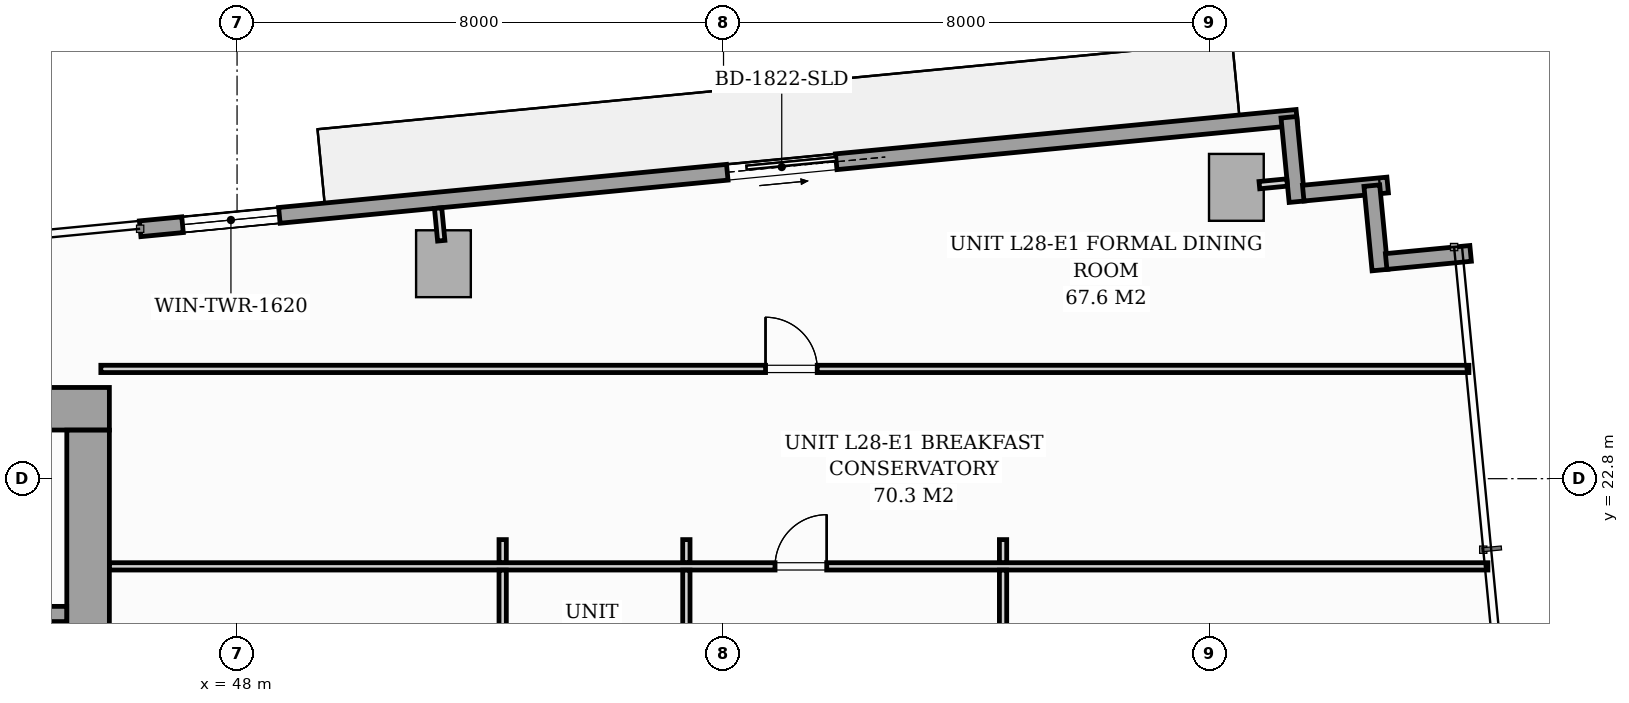
"""IFC4 building model, lengths in metres.
Left out: names, types, materials, properties, quantities, classifications, styles, units other than length and angle.
Written with IfcOpenShell. Run it as: python <this file> out.ifc"""

import sys

from ifc_helpers import new_model, si_unit, direction, frame, frame_2d, origin, origin_2d, place, context, subcontext, project, spatial, rectangle, i_section, extrude, source, transform, mapped, element, fill, save


model = new_model("IFC4")
c1 = context("Model", 3, precision=1e-05, world=origin(), true_north=direction((0.0, 1.0)))
c2 = subcontext(c1, "Body", "Model", "MODEL_VIEW")
j1 = project(units=[si_unit("LENGTHUNIT", "METRE"), si_unit("PLANEANGLEUNIT", "RADIAN")], contexts=[c1])
p1 = place(None, origin())
s1 = spatial("IfcSite", under=j1, at=p1, CompositionType="ELEMENT")
p2 = place(p1, origin())
s2 = spatial("IfcBuilding", under=s1, at=p2, CompositionType="ELEMENT")
p3 = place(p2, frame((0.0, 0.0, 100.2)))
s3 = spatial("IfcBuildingStorey", under=s2, at=p3, CompositionType="ELEMENT", Elevation=100.2)
m1 = source(origin(), c2, "Body", "SweptSolid", [
    extrude(i_section(OverallWidth=0.427, OverallDepth=0.483, WebThickness=0.051, FlangeThickness=0.082, FilletRadius=0.018, at=origin_2d()), origin(), (0.0, 0.0, 1.0), 3.196),
])
p4 = place(p3, frame((45.6, 24.0, 0.002), z_axis=(0.0, 0.0, 1.0), x_axis=(1.0, 0.0, 0.0)))
e1 = element("IfcColumn", 1, at=p4, inside=s3, PredefinedType="PILASTER", context=c2, shape_type="MappedRepresentation", body=[
    mapped(m1, transform((0.0, 0.0, 0.0), scale=1.0)),
])
m2 = source(origin(), c2, "Body", "SweptSolid", [
    extrude(rectangle(XDim=0.9, YDim=1.1, at=origin_2d()), origin(), (0.0, 0.0, 1.0), 3.196),
])
for number, where, z_axis, x_axis in (
    (2, (51.394, 26.335, 0.002), (0.0, 0.0, 1.0), (0.995, 0.096, 0.0)),
    (3, (64.434, 27.591, 0.002), (0.0, 0.0, 1.0), (0.995, 0.096, 0.0)),
):
    element("IfcColumn", number, at=place(p3, frame(where, z_axis=z_axis, x_axis=x_axis)), inside=s3, PredefinedType="COLUMN", context=c2, shape_type="MappedRepresentation", body=[
        mapped(m2, transform((0.0, 0.0, 0.0), scale=1.0)),
    ])
p5 = place(p3, frame((46.406, 26.91, 0.0), z_axis=(0.0, 0.0, 1.0), x_axis=(0.995396638587, 0.095841180552, 0.0)))
e4 = element("IfcWall", 4, at=p5, inside=s3, PredefinedType="STANDARD", context=c2, shape_type="SweptSolid", body=[
    extrude(rectangle(XDim=19.11, YDim=0.26, at=frame_2d((9.555, 0.0))), origin(), (0.0, 0.0, 1.0), 2.94),
])
p6 = place(p5, frame((9.7, 0.0, 0.0)))
e5 = element("IfcOpeningElement", 5, at=p6, cuts=e4, PredefinedType="OPENING", context=c2, shape_type="SweptSolid", body=[
    extrude(rectangle(XDim=1.8, YDim=2.06, at=frame_2d((0.9, 1.03))), frame((0.0, 0.14, 0.0), z_axis=(0.0, -1.0, 0.0), x_axis=(1.0, 0.0, 0.0)), (0.0, 0.0, 1.0), 0.28),
])
p7 = place(p5, frame((0.7, 0.0, 0.65)))
e6 = element("IfcOpeningElement", 6, at=p7, cuts=e4, PredefinedType="OPENING", context=c2, shape_type="SweptSolid", body=[
    extrude(rectangle(XDim=1.6, YDim=1.5, at=frame_2d((0.8, 0.75))), frame((0.0, 0.14, 0.0), z_axis=(0.0, -1.0, 0.0), x_axis=(1.0, 0.0, 0.0)), (0.0, 0.0, 1.0), 0.28),
])
for number, where, z_axis, x_axis in (
    (7, (65.298, 28.744, 0.0), (0.0, 0.0, 1.0), (0.096, -0.995, 0.0)),
    (8, (65.533, 27.496, 0.0), (0.0, 0.0, 1.0), (0.995, 0.096, 0.0)),
):
    element("IfcWall", number, at=place(p3, frame(where, z_axis=z_axis, x_axis=x_axis)), inside=s3, PredefinedType="STANDARD", context=c2, shape_type="SweptSolid", body=[
        extrude(rectangle(XDim=1.395, YDim=0.26, at=frame_2d((0.698, 0.0))), origin(), (0.0, 0.0, 1.0), 2.94),
    ])
p8 = place(p3, frame((66.662, 27.619, 0.0), z_axis=(0.0, 0.0, 1.0), x_axis=(0.095742423056, -0.99540614245, 0.0)))
e9 = element("IfcWall", 9, at=p8, inside=s3, PredefinedType="STANDARD", context=c2, shape_type="SweptSolid", body=[
    extrude(rectangle(XDim=1.395, YDim=0.26, at=frame_2d((0.697, 0.0))), origin(), (0.0, 0.0, 1.0), 2.94),
])
p9 = place(p3, frame((66.897, 26.371, 0.0), z_axis=(0.0, 0.0, 1.0), x_axis=(0.995391056452, 0.09589913835, 0.0)))
e10 = element("IfcWall", 10, at=p9, inside=s3, PredefinedType="STANDARD", context=c2, shape_type="SweptSolid", body=[
    extrude(rectangle(XDim=1.395, YDim=0.26, at=frame_2d((0.698, 0.0))), origin(), (0.0, 0.0, 1.0), 2.94),
])
p10 = place(p3, frame((26.1, 23.95, 0.0), z_axis=(0.0, 0.0, 1.0), x_axis=(1.0, 0.0, 0.0)))
e11 = element("IfcWall", 11, at=p10, inside=s3, PredefinedType="SHEAR", context=c2, shape_type="SweptSolid", body=[
    extrude(rectangle(XDim=19.8, YDim=0.7, at=frame_2d((9.9, 0.0))), origin(), (0.0, 0.0, 1.0), 3.2),
])
p11 = place(p3, frame((45.55, 17.802, 0.0), z_axis=(0.0, 0.0, 1.0), x_axis=(0.0, 1.0, 0.0)))
e12 = element("IfcWall", 12, at=p11, inside=s3, PredefinedType="SHEAR", context=c2, shape_type="SweptSolid", body=[
    extrude(rectangle(XDim=5.796, YDim=0.7, at=frame_2d((2.898, 0.0))), origin(), (0.0, 0.0, 1.0), 3.2),
])
p12 = place(p3, frame((37.05, 20.575, 0.0), z_axis=(0.0, 0.0, 1.0), x_axis=(1.0, 0.0, 0.0)))
e13 = element("IfcWall", 13, at=p12, inside=s3, PredefinedType="SOLIDWALL", context=c2, shape_type="SweptSolid", body=[
    extrude(rectangle(XDim=8.148, YDim=0.25, at=frame_2d((4.074, 0.0))), origin(), (0.0, 0.0, 1.0), 3.2),
])
p13 = place(p12, frame((6.6, 0.0, 0.0)))
e14 = element("IfcOpeningElement", 14, at=p13, cuts=e13, PredefinedType="OPENING", context=c2, shape_type="SweptSolid", body=[
    extrude(rectangle(XDim=0.95, YDim=2.06, at=frame_2d((0.475, 1.03))), frame((0.0, 0.135, 0.0), z_axis=(0.0, -1.0, 0.0), x_axis=(1.0, 0.0, 0.0)), (0.0, 0.0, 1.0), 0.27),
])
p14 = place(p3, frame((45.76, 24.605, 0.0), z_axis=(0.0, 0.0, 1.0), x_axis=(1.0, 0.0, 0.0)))
e15 = element("IfcWall", 15, at=p14, inside=s3, PredefinedType="PARTITIONING", context=c2, shape_type="SweptSolid", body=[
    extrude(rectangle(XDim=22.498, YDim=0.12, at=frame_2d((11.249, 0.0))), origin(), (0.0, 0.0, 1.0), 2.94),
])
p15 = place(p14, frame((10.931, 0.0, 0.0)))
e16 = element("IfcOpeningElement", 16, at=p15, cuts=e15, PredefinedType="OPENING", context=c2, shape_type="SweptSolid", body=[
    extrude(rectangle(XDim=0.85, YDim=2.05, at=frame_2d((0.425, 1.025))), frame((0.0, 0.07, 0.0), z_axis=(0.0, -1.0, 0.0), x_axis=(1.0, 0.0, 0.0)), (0.0, 0.0, 1.0), 0.14),
])
p16 = place(p3, frame((45.902, 21.358, 0.0), z_axis=(0.0, 0.0, 1.0), x_axis=(1.0, 0.0, 0.0)))
e17 = element("IfcWall", 17, at=p16, inside=s3, PredefinedType="PARTITIONING", context=c2, shape_type="SweptSolid", body=[
    extrude(rectangle(XDim=22.668, YDim=0.12, at=frame_2d((11.334, 0.0))), origin(), (0.0, 0.0, 1.0), 2.94),
])
p17 = place(p16, frame((10.945, 0.0, 0.0)))
e18 = element("IfcOpeningElement", 18, at=p17, cuts=e17, PredefinedType="OPENING", context=c2, shape_type="SweptSolid", body=[
    extrude(rectangle(XDim=0.85, YDim=2.05, at=frame_2d((0.425, 1.025))), frame((0.0, 0.07, 0.0), z_axis=(0.0, -1.0, 0.0), x_axis=(1.0, 0.0, 0.0)), (0.0, 0.0, 1.0), 0.14),
])
p18 = place(p3, frame((60.597, 10.209, 0.0), z_axis=(0.0, 0.0, 1.0), x_axis=(0.0, 1.0, 0.0)))
e19 = element("IfcWall", 19, at=p18, inside=s3, PredefinedType="PARTITIONING", context=c2, shape_type="SweptSolid", body=[
    extrude(rectangle(XDim=11.087, YDim=0.12, at=frame_2d((5.543, 0.0))), origin(), (0.0, 0.0, 1.0), 2.94),
])
p19 = place(p18, frame((5.118, 0.0, 0.0)))
e20 = element("IfcOpeningElement", 20, at=p19, cuts=e19, PredefinedType="OPENING", context=c2, shape_type="SweptSolid", body=[
    extrude(rectangle(XDim=0.85, YDim=2.05, at=frame_2d((0.425, 1.025))), frame((0.0, 0.07, 0.0), z_axis=(0.0, -1.0, 0.0), x_axis=(1.0, 0.0, 0.0)), (0.0, 0.0, 1.0), 0.14),
])
p20 = place(p3, frame((60.597, 21.42, 0.0), z_axis=(0.0, 0.0, 1.0), x_axis=(0.0, 1.0, 0.0)))
e21 = element("IfcWall", 21, at=p20, inside=s3, PredefinedType="PARTITIONING", context=c2, shape_type="SweptSolid", body=[
    extrude(rectangle(XDim=0.378, YDim=0.12, at=frame_2d((0.189, 0.0))), origin(), (0.0, 0.0, 1.0), 2.94),
])
p21 = place(p3, frame((55.389, 10.209, 0.0), z_axis=(0.0, 0.0, 1.0), x_axis=(0.0, 1.0, 0.0)))
e22 = element("IfcWall", 22, at=p21, inside=s3, PredefinedType="PARTITIONING", context=c2, shape_type="SweptSolid", body=[
    extrude(rectangle(XDim=11.087, YDim=0.12, at=frame_2d((5.543, 0.0))), origin(), (0.0, 0.0, 1.0), 2.94),
])
p22 = place(p21, frame((5.118, 0.0, 0.0)))
e23 = element("IfcOpeningElement", 23, at=p22, cuts=e22, PredefinedType="OPENING", context=c2, shape_type="SweptSolid", body=[
    extrude(rectangle(XDim=0.85, YDim=2.05, at=frame_2d((0.425, 1.025))), frame((0.0, 0.07, 0.0), z_axis=(0.0, -1.0, 0.0), x_axis=(1.0, 0.0, 0.0)), (0.0, 0.0, 1.0), 0.14),
])
p23 = place(p3, frame((55.389, 21.42, 0.0), z_axis=(0.0, 0.0, 1.0), x_axis=(0.0, 1.0, 0.0)))
e24 = element("IfcWall", 24, at=p23, inside=s3, PredefinedType="PARTITIONING", context=c2, shape_type="SweptSolid", body=[
    extrude(rectangle(XDim=0.378, YDim=0.12, at=frame_2d((0.189, 0.0))), origin(), (0.0, 0.0, 1.0), 2.94),
])
p24 = place(p3, frame((52.368, 10.209, 0.0), z_axis=(0.0, 0.0, 1.0), x_axis=(0.0, 1.0, 0.0)))
e25 = element("IfcWall", 25, at=p24, inside=s3, PredefinedType="PARTITIONING", context=c2, shape_type="SweptSolid", body=[
    extrude(rectangle(XDim=11.087, YDim=0.12, at=frame_2d((5.543, 0.0))), origin(), (0.0, 0.0, 1.0), 2.94),
])
p25 = place(p24, frame((5.118, 0.0, 0.0)))
e26 = element("IfcOpeningElement", 26, at=p25, cuts=e25, PredefinedType="OPENING", context=c2, shape_type="SweptSolid", body=[
    extrude(rectangle(XDim=0.85, YDim=2.05, at=frame_2d((0.425, 1.025))), frame((0.0, 0.07, 0.0), z_axis=(0.0, -1.0, 0.0), x_axis=(1.0, 0.0, 0.0)), (0.0, 0.0, 1.0), 0.14),
])
p26 = place(p3, frame((52.368, 21.42, 0.0), z_axis=(0.0, 0.0, 1.0), x_axis=(0.0, 1.0, 0.0)))
e27 = element("IfcWall", 27, at=p26, inside=s3, PredefinedType="PARTITIONING", context=c2, shape_type="SweptSolid", body=[
    extrude(rectangle(XDim=0.378, YDim=0.12, at=frame_2d((0.189, 0.0))), origin(), (0.0, 0.0, 1.0), 2.94),
])
p27 = place(p3, frame((51.358, 26.713, 0.0), z_axis=(0.0, 0.0, 1.0), x_axis=(-0.095772948675, 0.995403205893, 0.0)))
e28 = element("IfcWall", 28, at=p27, inside=s3, PredefinedType="PARTITIONING", context=c2, shape_type="SweptSolid", body=[
    extrude(rectangle(XDim=0.538, YDim=0.12, at=frame_2d((0.269, 0.0))), origin(), (0.0, 0.0, 1.0), 2.94),
])
p28 = place(p3, frame((64.812, 27.627, 0.0), z_axis=(0.0, 0.0, 1.0), x_axis=(0.995389482415, 0.095915474751, 0.0)))
e29 = element("IfcWall", 29, at=p28, inside=s3, PredefinedType="PARTITIONING", context=c2, shape_type="SweptSolid", body=[
    extrude(rectangle(XDim=0.458, YDim=0.12, at=frame_2d((0.229, 0.0))), origin(), (0.0, 0.0, 1.0), 2.94),
])
m3 = source(origin(), c2, "Body", "SweptSolid", [
    extrude(rectangle(XDim=1.8, YDim=2.06, at=frame_2d((0.9, 1.03))), frame((0.0, 0.025, 0.0), z_axis=(0.0, -1.0, 0.0), x_axis=(1.0, 0.0, 0.0)), (0.0, 0.0, 1.0), 0.05),
])
p29 = place(p6, origin())
e30 = element("IfcDoor", 30, at=p29, inside=s3, OperationType="SLIDING_TO_RIGHT", PredefinedType="DOOR", context=c2, shape_type="MappedRepresentation", body=[
    mapped(m3, transform((0.0, 0.0, 0.0), scale=1.0)),
])
fill(e5, e30)
m4 = source(origin(), c2, "Body", "SweptSolid", [
    extrude(rectangle(XDim=1.6, YDim=1.5, at=frame_2d((0.8, 0.75))), frame((0.0, 0.03, 0.0), z_axis=(0.0, -1.0, 0.0), x_axis=(1.0, 0.0, 0.0)), (0.0, 0.0, 1.0), 0.06),
])
p30 = place(p7, origin())
e31 = element("IfcWindow", 31, at=p30, inside=s3, PartitioningType="SINGLE_PANEL", PredefinedType="WINDOW", context=c2, shape_type="MappedRepresentation", body=[
    mapped(m4, transform((0.0, 0.0, 0.0), scale=1.0)),
])
fill(e6, e31)
m5 = source(origin(), c2, "Body", "SweptSolid", [
    extrude(rectangle(XDim=0.85, YDim=2.05, at=frame_2d((0.425, 1.025))), frame((0.0, 0.025, 0.0), z_axis=(0.0, -1.0, 0.0), x_axis=(1.0, 0.0, 0.0)), (0.0, 0.0, 1.0), 0.05),
])
p31 = place(p15, origin())
e32 = element("IfcDoor", 32, at=p31, inside=s3, OperationType="SINGLE_SWING_LEFT", PredefinedType="DOOR", context=c2, shape_type="MappedRepresentation", body=[
    mapped(m5, transform((0.0, 0.0, 0.0), scale=1.0)),
])
fill(e16, e32)
p32 = place(p17, origin())
e33 = element("IfcDoor", 33, at=p32, inside=s3, OperationType="SINGLE_SWING_RIGHT", PredefinedType="DOOR", context=c2, shape_type="MappedRepresentation", body=[
    mapped(m5, transform((0.0, 0.0, 0.0), scale=1.0)),
])
fill(e18, e33)
save(model, sys.argv[1])
